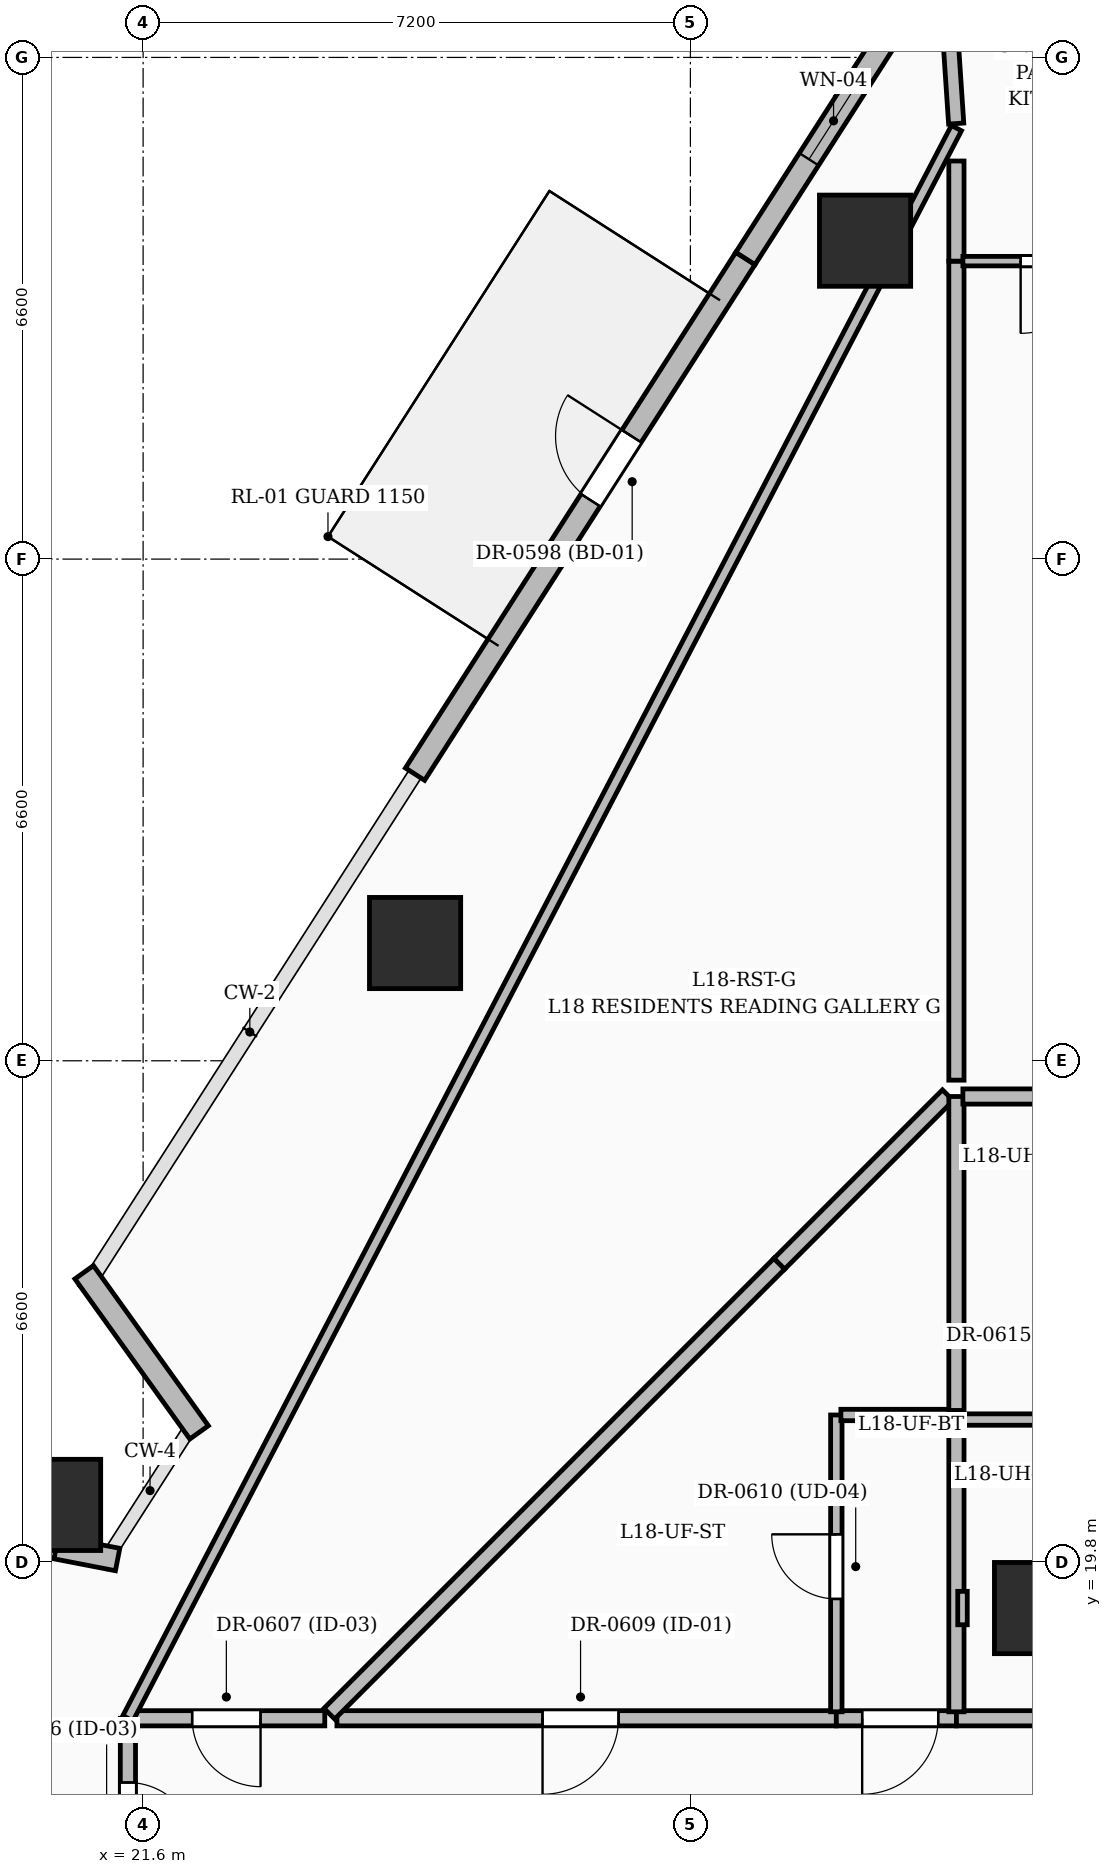
"""IFC4 building model, lengths in metres.
Left out: names, types, materials, properties, quantities, classifications, styles, units other than length and angle.
Written with IfcOpenShell. Run it as: python <this file> out.ifc"""

import sys

from ifc_helpers import new_model, si_unit, direction, frame, frame_2d, origin, origin_2d, place, context, subcontext, project, spatial, rectangle, extrude, element, fill, save


model = new_model("IFC4")
c1 = context("Model", 3, precision=1e-05, world=origin(), true_north=direction((0.0, 1.0)))
c2 = subcontext(c1, "Body", "Model", "MODEL_VIEW")
j1 = project(units=[si_unit("LENGTHUNIT", "METRE"), si_unit("PLANEANGLEUNIT", "RADIAN")], contexts=[c1])
p1 = place(None, origin())
s1 = spatial("IfcSite", under=j1, at=p1, CompositionType="ELEMENT")
p2 = place(p1, origin())
s2 = spatial("IfcBuilding", under=s1, at=p2, CompositionType="ELEMENT")
p3 = place(p2, frame((0.0, 0.0, 75.0)))
s3 = spatial("IfcBuildingStorey", under=s2, at=p3, CompositionType="ELEMENT", Elevation=75.0)
for number, where, z_axis, x_axis in (
    (1, (33.4, 19.2, 0.0), (0.0, 0.0, 1.0), (1.0, 0.0, 0.0)),
    (2, (31.098, 37.189, 0.0), (0.0, 0.0, 1.0), (1.0, 0.0, 0.0)),
    (3, (25.178, 27.949, 0.0), (0.0, 0.0, 1.0), (1.0, 0.0, 0.0)),
    (4, (20.442, 20.557, 0.0), (0.0, 0.0, 1.0), (1.0, 0.0, 0.0)),
):
    element("IfcColumn", number, at=place(p3, frame(where, z_axis=z_axis, x_axis=x_axis)), inside=s3, PredefinedType="COLUMN", context=c2, shape_type="SweptSolid", body=[
        extrude(rectangle(XDim=1.2, YDim=1.2, at=origin_2d()), origin(), (0.0, 0.0, 1.0), 3.6),
    ])
p4 = place(p3, frame((20.456, 19.995, 0.0), z_axis=(0.0, 0.0, 1.0), x_axis=(0.981715557517, -0.190353786749, 0.0)))
e5 = element("IfcWall", 5, at=p4, inside=s3, PredefinedType="SOLIDWALL", context=c2, shape_type="SweptSolid", body=[
    extrude(rectangle(XDim=0.823, YDim=0.3, at=frame_2d((0.412, 0.0))), origin(), (0.0, 0.0, 1.0), 2.35),
])
p5 = place(p3, frame((22.337, 21.511, 0.0), z_axis=(0.0, 0.0, 1.0), x_axis=(-0.583178108206, 0.812344319922, 0.0)))
e6 = element("IfcWall", 6, at=p5, inside=s3, PredefinedType="SOLIDWALL", context=c2, shape_type="SweptSolid", body=[
    extrude(rectangle(XDim=2.593, YDim=0.3, at=frame_2d((1.296, 0.0))), origin(), (0.0, 0.0, 1.0), 2.375),
])
p6 = place(p3, frame((25.177, 30.171, 0.0), z_axis=(0.0, 0.0, 1.0), x_axis=(0.539427662029, 0.842031945616, 0.0)))
e7 = element("IfcWall", 7, at=p6, inside=s3, PredefinedType="SOLIDWALL", context=c2, shape_type="SweptSolid", body=[
    extrude(rectangle(XDim=8.057, YDim=0.3, at=frame_2d((4.029, 0.0))), origin(), (0.0, 0.0, 1.0), 3.35),
])
p7 = place(p6, frame((4.281, 0.0, 0.0)))
e8 = element("IfcOpeningElement", 8, at=p7, cuts=e7, PredefinedType="OPENING", context=c2, shape_type="SweptSolid", body=[
    extrude(rectangle(XDim=1.0, YDim=2.2, at=frame_2d((0.5, 1.1))), frame((0.0, 0.16, 0.0), z_axis=(0.0, -1.0, 0.0), x_axis=(1.0, 0.0, 0.0)), (0.0, 0.0, 1.0), 0.32),
])
p8 = place(p3, frame((29.524, 36.955, 0.0), z_axis=(0.0, 0.0, 1.0), x_axis=(0.539470626143, 0.842004420136, 0.0)))
e9 = element("IfcWall", 9, at=p8, inside=s3, PredefinedType="SOLIDWALL", context=c2, shape_type="SweptSolid", body=[
    extrude(rectangle(XDim=8.058, YDim=0.3, at=frame_2d((4.029, 0.0))), origin(), (0.0, 0.0, 1.0), 3.35),
])
p9 = place(p8, frame((1.55, 0.0, 0.8)))
e10 = element("IfcOpeningElement", 10, at=p9, cuts=e9, PredefinedType="OPENING", context=c2, shape_type="SweptSolid", body=[
    extrude(rectangle(XDim=1.2, YDim=1.8, at=frame_2d((0.6, 0.9))), frame((0.0, 0.16, 0.0), z_axis=(0.0, -1.0, 0.0), x_axis=(1.0, 0.0, 0.0)), (0.0, 0.0, 1.0), 0.32),
])
p10 = place(p3, frame((21.4, 17.75, 0.0), z_axis=(0.0, 0.0, 1.0), x_axis=(0.0, -1.0, 0.0)))
e11 = element("IfcWall", 11, at=p10, inside=s3, PredefinedType="PARTITIONING", context=c2, shape_type="SweptSolid", body=[
    extrude(rectangle(XDim=2.59, YDim=0.2, at=frame_2d((1.295, 0.0))), origin(), (0.0, 0.0, 1.0), 2.911),
])
p11 = place(p10, frame((0.845, 0.0, 0.0)))
e12 = element("IfcOpeningElement", 12, at=p11, cuts=e11, PredefinedType="OPENING", context=c2, shape_type="SweptSolid", body=[
    extrude(rectangle(XDim=0.9, YDim=2.1, at=frame_2d((0.45, 1.05))), frame((0.0, 0.11, 0.0), z_axis=(0.0, -1.0, 0.0), x_axis=(1.0, 0.0, 0.0)), (0.0, 0.0, 1.0), 0.22),
])
p12 = place(p3, frame((30.72, 17.75, 0.0), z_axis=(0.0, 0.0, 1.0), x_axis=(-1.0, 0.0, 0.0)))
e13 = element("IfcWall", 13, at=p12, inside=s3, PredefinedType="PARTITIONING", context=c2, shape_type="SweptSolid", body=[
    extrude(rectangle(XDim=6.57, YDim=0.2, at=frame_2d((3.285, 0.0))), origin(), (0.0, 0.0, 1.0), 2.345),
])
p13 = place(p12, frame((2.865, 0.0, 0.0)))
e14 = element("IfcOpeningElement", 14, at=p13, cuts=e13, PredefinedType="OPENING", context=c2, shape_type="SweptSolid", body=[
    extrude(rectangle(XDim=1.0, YDim=2.2, at=frame_2d((0.5, 1.1))), frame((0.0, 0.11, 0.0), z_axis=(0.0, -1.0, 0.0), x_axis=(1.0, 0.0, 0.0)), (0.0, 0.0, 1.0), 0.22),
])
p14 = place(p3, frame((32.3, 17.75, 0.0), z_axis=(0.0, 0.0, 1.0), x_axis=(-1.0, 0.0, 0.0)))
e15 = element("IfcWall", 15, at=p14, inside=s3, PredefinedType="PARTITIONING", context=c2, shape_type="SweptSolid", body=[
    extrude(rectangle(XDim=1.58, YDim=0.2, at=frame_2d((0.79, 0.0))), origin(), (0.0, 0.0, 1.0), 3.35),
])
p15 = place(p14, frame((0.24, 0.0, 0.0)))
e16 = element("IfcOpeningElement", 16, at=p15, cuts=e15, PredefinedType="OPENING", context=c2, shape_type="SweptSolid", body=[
    extrude(rectangle(XDim=1.0, YDim=2.2, at=frame_2d((0.5, 1.1))), frame((0.0, 0.11, 0.0), z_axis=(0.0, -1.0, 0.0), x_axis=(1.0, 0.0, 0.0)), (0.0, 0.0, 1.0), 0.22),
])
p16 = place(p3, frame((23.99, 17.75, 0.0), z_axis=(0.0, 0.0, 1.0), x_axis=(-1.0, 0.0, 0.0)))
e17 = element("IfcWall", 17, at=p16, inside=s3, PredefinedType="PARTITIONING", context=c2, shape_type="SweptSolid", body=[
    extrude(rectangle(XDim=2.505, YDim=0.2, at=frame_2d((1.252, 0.0))), origin(), (0.0, 0.0, 1.0), 2.345),
])
p17 = place(p16, frame((0.845, 0.0, 0.0)))
e18 = element("IfcOpeningElement", 18, at=p17, cuts=e17, PredefinedType="OPENING", context=c2, shape_type="SweptSolid", body=[
    extrude(rectangle(XDim=0.9, YDim=2.1, at=frame_2d((0.45, 1.05))), frame((0.0, 0.11, 0.0), z_axis=(0.0, -1.0, 0.0), x_axis=(1.0, 0.0, 0.0)), (0.0, 0.0, 1.0), 0.22),
])
p18 = place(p3, frame((34.87, 17.75, 0.0), z_axis=(0.0, 0.0, 1.0), x_axis=(-1.0, 0.0, 0.0)))
e19 = element("IfcWall", 19, at=p18, inside=s3, PredefinedType="PARTITIONING", context=c2, shape_type="SweptSolid", body=[
    extrude(rectangle(XDim=2.57, YDim=0.2, at=frame_2d((1.285, 0.0))), origin(), (0.0, 0.0, 1.0), 2.309),
])
p19 = place(p3, frame((21.4, 17.75, 0.0), z_axis=(0.0, 0.0, 1.0), x_axis=(0.46207959711, 0.886838455376, 0.0)))
e20 = element("IfcWall", 20, at=p19, inside=s3, PredefinedType="PARTITIONING", context=c2, shape_type="SweptSolid", body=[
    extrude(rectangle(XDim=23.589, YDim=0.15, at=frame_2d((11.795, 0.0))), origin(), (0.0, 0.0, 1.0), 2.345),
])
p20 = place(p3, frame((32.297, 38.73, 0.0), z_axis=(0.0, 0.0, 1.0), x_axis=(-0.066629370629, 0.997777794386, 0.0)))
e21 = element("IfcWall", 21, at=p20, inside=s3, PredefinedType="PARTITIONING", context=c2, shape_type="SweptSolid", body=[
    extrude(rectangle(XDim=2.056, YDim=0.2, at=frame_2d((1.028, 0.0))), origin(), (0.0, 0.0, 1.0), 3.35),
])
p21 = place(p3, frame((30.72, 17.835, 0.0), z_axis=(0.0, 0.0, 1.0), x_axis=(0.0, 1.0, 0.0)))
e22 = element("IfcWall", 22, at=p21, inside=s3, PredefinedType="PARTITIONING", context=c2, shape_type="SweptSolid", body=[
    extrude(rectangle(XDim=3.905, YDim=0.15, at=frame_2d((1.953, 0.0))), origin(), (0.0, 0.0, 1.0), 2.345),
])
p22 = place(p21, frame((1.485, 0.0, 0.0)))
e23 = element("IfcOpeningElement", 23, at=p22, cuts=e22, PredefinedType="OPENING", context=c2, shape_type="SweptSolid", body=[
    extrude(rectangle(XDim=0.85, YDim=2.1, at=frame_2d((0.425, 1.05))), frame((0.0, 0.085, 0.0), z_axis=(0.0, -1.0, 0.0), x_axis=(1.0, 0.0, 0.0)), (0.0, 0.0, 1.0), 0.17),
])
p23 = place(p3, frame((29.97, 23.73, 0.0), z_axis=(0.0, 0.0, 1.0), x_axis=(-0.707106781187, -0.707106781187, 0.0)))
e24 = element("IfcWall", 24, at=p23, inside=s3, PredefinedType="PARTITIONING", context=c2, shape_type="SweptSolid", body=[
    extrude(rectangle(XDim=8.372, YDim=0.2, at=frame_2d((4.186, 0.0))), origin(), (0.0, 0.0, 1.0), 2.345),
])
p24 = place(p3, frame((30.78, 21.74, 0.0), z_axis=(0.0, 0.0, 1.0), x_axis=(1.0, 0.0, 0.0)))
e25 = element("IfcWall", 25, at=p24, inside=s3, PredefinedType="PARTITIONING", context=c2, shape_type="SweptSolid", body=[
    extrude(rectangle(XDim=1.52, YDim=0.15, at=frame_2d((0.76, 0.0))), origin(), (0.0, 0.0, 1.0), 2.345),
])
p25 = place(p3, frame((32.187, 25.947, 0.0), z_axis=(0.0, 0.0, 1.0), x_axis=(-0.707106781187, -0.707106781187, 0.0)))
e26 = element("IfcWall", 26, at=p25, inside=s3, PredefinedType="PARTITIONING", context=c2, shape_type="SweptSolid", body=[
    extrude(rectangle(XDim=3.135, YDim=0.2, at=frame_2d((1.568, 0.0))), origin(), (0.0, 0.0, 1.0), 3.35),
])
p26 = place(p3, frame((32.3, 21.8, 0.0), z_axis=(0.0, 0.0, 1.0), x_axis=(0.0, 1.0, 0.0)))
e27 = element("IfcWall", 27, at=p26, inside=s3, PredefinedType="PARTITIONING", context=c2, shape_type="SweptSolid", body=[
    extrude(rectangle(XDim=4.13, YDim=0.2, at=frame_2d((2.065, 0.0))), origin(), (0.0, 0.0, 1.0), 2.911),
])
p27 = place(p3, frame((32.3, 17.835, 0.0), z_axis=(0.0, 0.0, 1.0), x_axis=(0.0, 1.0, 0.0)))
e28 = element("IfcWall", 28, at=p27, inside=s3, PredefinedType="PARTITIONING", context=c2, shape_type="SweptSolid", body=[
    extrude(rectangle(XDim=3.845, YDim=0.2, at=frame_2d((1.922, 0.0))), origin(), (0.0, 0.0, 1.0), 2.345),
])
p28 = place(p3, frame((32.3, 26.145, 0.0), z_axis=(0.0, 0.0, 1.0), x_axis=(0.0, 1.0, 0.0)))
e29 = element("IfcWall", 29, at=p28, inside=s3, PredefinedType="PARTITIONING", context=c2, shape_type="SweptSolid", body=[
    extrude(rectangle(XDim=10.775, YDim=0.2, at=frame_2d((5.387, 0.0))), origin(), (0.0, 0.0, 1.0), 2.345),
])
p29 = place(p3, frame((32.3, 36.92, 0.0), z_axis=(0.0, 0.0, 1.0), x_axis=(0.0, 1.0, 0.0)))
e30 = element("IfcWall", 30, at=p29, inside=s3, PredefinedType="PARTITIONING", context=c2, shape_type="SweptSolid", body=[
    extrude(rectangle(XDim=1.317, YDim=0.2, at=frame_2d((0.659, 0.0))), origin(), (0.0, 0.0, 1.0), 2.37),
])
p30 = place(p3, frame((34.5, 21.68, 0.0), z_axis=(0.0, 0.0, 1.0), x_axis=(-1.0, 0.0, 0.0)))
e31 = element("IfcWall", 31, at=p30, inside=s3, PredefinedType="PARTITIONING", context=c2, shape_type="SweptSolid", body=[
    extrude(rectangle(XDim=2.115, YDim=0.15, at=frame_2d((1.058, 0.0))), origin(), (0.0, 0.0, 1.0), 3.35),
])
p31 = place(p3, frame((34.44, 25.93, 0.0), z_axis=(0.0, 0.0, 1.0), x_axis=(-1.0, 0.0, 0.0)))
e32 = element("IfcWall", 32, at=p31, inside=s3, PredefinedType="PARTITIONING", context=c2, shape_type="SweptSolid", body=[
    extrude(rectangle(XDim=2.055, YDim=0.2, at=frame_2d((1.027, 0.0))), origin(), (0.0, 0.0, 1.0), 2.911),
])
p32 = place(p3, frame((34.94, 36.92, 0.0), z_axis=(0.0, 0.0, 1.0), x_axis=(-1.0, 0.0, 0.0)))
e33 = element("IfcWall", 33, at=p32, inside=s3, PredefinedType="PARTITIONING", context=c2, shape_type="SweptSolid", body=[
    extrude(rectangle(XDim=2.555, YDim=0.125, at=frame_2d((1.277, 0.0))), origin(), (0.0, 0.0, 1.0), 2.37),
])
p33 = place(p32, frame((0.845, 0.0, 0.0)))
e34 = element("IfcOpeningElement", 34, at=p33, cuts=e33, PredefinedType="OPENING", context=c2, shape_type="SweptSolid", body=[
    extrude(rectangle(XDim=0.95, YDim=2.2, at=frame_2d((0.475, 1.1))), frame((0.0, 0.072, 0.0), z_axis=(0.0, -1.0, 0.0), x_axis=(1.0, 0.0, 0.0)), (0.0, 0.0, 1.0), 0.145),
])
p34 = place(p3, frame((32.38, 18.98, 0.0), z_axis=(0.0, 0.0, 1.0), x_axis=(0.0, 1.0, 0.0)))
e35 = element("IfcWall", 35, at=p34, inside=s3, PredefinedType="PARTITIONING", context=c2, shape_type="SweptSolid", body=[
    extrude(rectangle(XDim=0.44, YDim=0.125, at=frame_2d((0.22, 0.0))), origin(), (0.0, 0.0, 1.0), 3.35),
])
p35 = place(p7, origin())
e36 = element("IfcDoor", 36, at=p35, inside=s3, OperationType="SINGLE_SWING_RIGHT", PredefinedType="DOOR", context=c2, shape_type="SweptSolid", body=[
    extrude(rectangle(XDim=1.0, YDim=2.2, at=frame_2d((0.5, 1.1))), frame((0.0, 0.025, 0.0), z_axis=(0.0, -1.0, 0.0), x_axis=(1.0, 0.0, 0.0)), (0.0, 0.0, 1.0), 0.05),
])
fill(e8, e36)
p36 = place(p9, origin())
e37 = element("IfcWindow", 37, at=p36, inside=s3, PartitioningType="SINGLE_PANEL", PredefinedType="WINDOW", context=c2, shape_type="SweptSolid", body=[
    extrude(rectangle(XDim=1.2, YDim=1.8, at=frame_2d((0.6, 0.9))), frame((0.0, 0.03, 0.0), z_axis=(0.0, -1.0, 0.0), x_axis=(1.0, 0.0, 0.0)), (0.0, 0.0, 1.0), 0.06),
])
fill(e10, e37)
p37 = place(p11, origin())
e38 = element("IfcDoor", 38, at=p37, inside=s3, OperationType="SINGLE_SWING_RIGHT", PredefinedType="DOOR", context=c2, shape_type="SweptSolid", body=[
    extrude(rectangle(XDim=0.9, YDim=2.1, at=frame_2d((0.45, 1.05))), frame((0.0, 0.025, 0.0), z_axis=(0.0, -1.0, 0.0), x_axis=(1.0, 0.0, 0.0)), (0.0, 0.0, 1.0), 0.05),
])
fill(e12, e38)
p38 = place(p17, origin())
e39 = element("IfcDoor", 39, at=p38, inside=s3, OperationType="SINGLE_SWING_LEFT", PredefinedType="DOOR", context=c2, shape_type="SweptSolid", body=[
    extrude(rectangle(XDim=0.9, YDim=2.1, at=frame_2d((0.45, 1.05))), frame((0.0, 0.025, 0.0), z_axis=(0.0, -1.0, 0.0), x_axis=(1.0, 0.0, 0.0)), (0.0, 0.0, 1.0), 0.05),
])
fill(e18, e39)
p39 = place(p13, origin())
e40 = element("IfcDoor", 40, at=p39, inside=s3, OperationType="SINGLE_SWING_RIGHT", PredefinedType="DOOR", context=c2, shape_type="SweptSolid", body=[
    extrude(rectangle(XDim=1.0, YDim=2.2, at=frame_2d((0.5, 1.1))), frame((0.0, 0.025, 0.0), z_axis=(0.0, -1.0, 0.0), x_axis=(1.0, 0.0, 0.0)), (0.0, 0.0, 1.0), 0.05),
])
fill(e14, e40)
p40 = place(p22, origin())
e41 = element("IfcDoor", 41, at=p40, inside=s3, OperationType="SINGLE_SWING_RIGHT", PredefinedType="DOOR", context=c2, shape_type="SweptSolid", body=[
    extrude(rectangle(XDim=0.85, YDim=2.1, at=frame_2d((0.425, 1.05))), frame((0.0, 0.025, 0.0), z_axis=(0.0, -1.0, 0.0), x_axis=(1.0, 0.0, 0.0)), (0.0, 0.0, 1.0), 0.05),
])
fill(e23, e41)
p41 = place(p33, origin())
e42 = element("IfcDoor", 42, at=p41, inside=s3, OperationType="SINGLE_SWING_RIGHT", PredefinedType="DOOR", context=c2, shape_type="SweptSolid", body=[
    extrude(rectangle(XDim=0.95, YDim=2.2, at=frame_2d((0.475, 1.1))), frame((0.0, 0.025, 0.0), z_axis=(0.0, -1.0, 0.0), x_axis=(1.0, 0.0, 0.0)), (0.0, 0.0, 1.0), 0.05),
])
fill(e34, e42)
p42 = place(p15, origin())
e43 = element("IfcDoor", 43, at=p42, inside=s3, OperationType="SINGLE_SWING_RIGHT", PredefinedType="DOOR", context=c2, shape_type="SweptSolid", body=[
    extrude(rectangle(XDim=1.0, YDim=2.2, at=frame_2d((0.5, 1.1))), frame((0.0, 0.025, 0.0), z_axis=(0.0, -1.0, 0.0), x_axis=(1.0, 0.0, 0.0)), (0.0, 0.0, 1.0), 0.05),
])
fill(e16, e43)
save(model, sys.argv[1])
